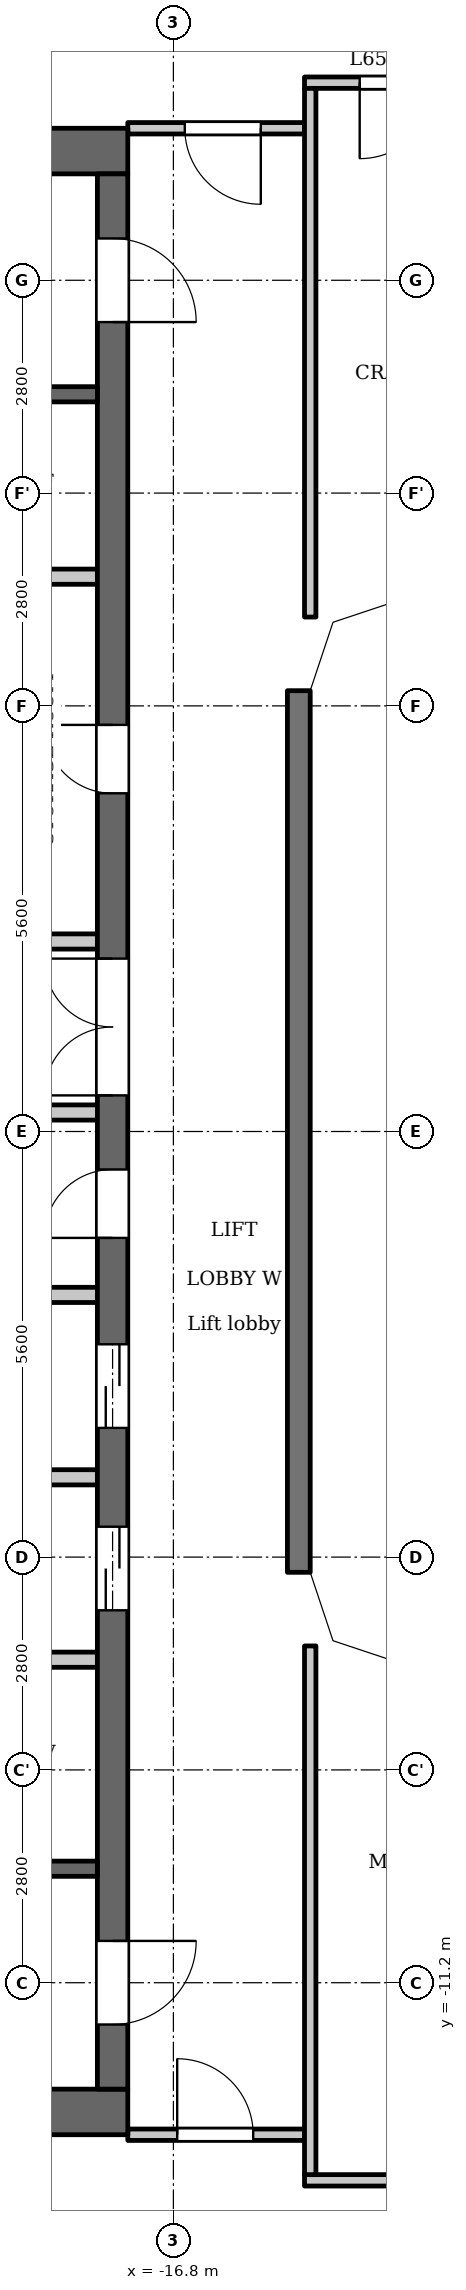
"""IFC4 building model, lengths in metres.
Left out: names, types, materials, properties, quantities, classifications, styles, units other than length and angle.
Written with IfcOpenShell. Run it as: python <this file> out.ifc"""

import sys

from ifc_helpers import new_model, si_unit, direction, frame, frame_2d, origin, place, context, subcontext, project, spatial, polyline, rectangle, outline, extrude, element, fill, save


model = new_model("IFC4")
c1 = context("Model", 3, precision=1e-05, world=origin(), true_north=direction((0.0, 1.0)))
c2 = subcontext(c1, "Body", "Model", "MODEL_VIEW")
j1 = project(units=[si_unit("LENGTHUNIT", "METRE"), si_unit("PLANEANGLEUNIT", "RADIAN")], contexts=[c1])
p1 = place(None, origin())
s1 = spatial("IfcSite", under=j1, at=p1, CompositionType="ELEMENT")
p2 = place(p1, origin())
s2 = spatial("IfcBuilding", under=s1, at=p2, CompositionType="ELEMENT")
p3 = place(p2, frame((0.0, 0.0, 252.2)))
s3 = spatial("IfcBuildingStorey", under=s2, at=p3, CompositionType="ELEMENT", Elevation=252.2)
p4 = place(p3, frame((-15.15, -5.8, 0.0), z_axis=(0.0, 0.0, 1.0), x_axis=(0.0, 1.0, 0.0)))
e1 = element("IfcWall", 1, at=p4, inside=s3, PredefinedType="SOLIDWALL", context=c2, shape_type="SweptSolid", body=[
    extrude(rectangle(XDim=11.6, YDim=0.3, at=frame_2d((5.8, 0.0))), origin(), (0.0, 0.0, 1.0), 3.2),
])
for number, where, z_axis, x_axis in (
    (2, (-17.4, 12.9, 0.0), (0.0, 0.0, 1.0), (-1.0, 0.0, 0.0)),
    (3, (-17.4, -12.9, 0.0), (0.0, 0.0, 1.0), (-1.0, 0.0, 0.0)),
):
    element("IfcWall", number, at=place(p3, frame(where, z_axis=z_axis, x_axis=x_axis)), inside=s3, PredefinedType="SHEAR", context=c2, shape_type="SweptSolid", body=[
        extrude(rectangle(XDim=7.32, YDim=0.6, at=frame_2d((3.66, 0.0))), origin(), (0.0, 0.0, 1.0), 3.2),
    ])
p5 = place(p3, frame((-17.6, -12.6, 0.0), z_axis=(0.0, 0.0, 1.0), x_axis=(0.0, 1.0, 0.0)))
e4 = element("IfcWall", 4, at=p5, inside=s3, PredefinedType="SHEAR", context=c2, shape_type="SweptSolid", body=[
    extrude(rectangle(XDim=25.2, YDim=0.4, at=frame_2d((12.6, 0.0))), origin(), (0.0, 0.0, 1.0), 3.2),
])
p6 = place(p5, frame((6.3, 0.0, 0.0)))
e5 = element("IfcOpeningElement", 5, at=p6, cuts=e4, PredefinedType="OPENING", context=c2, shape_type="SweptSolid", body=[
    extrude(rectangle(XDim=1.1, YDim=2.1, at=frame_2d((0.55, 1.05))), frame((0.0, 0.21, 0.0), z_axis=(0.0, -1.0, 0.0), x_axis=(1.0, 0.0, 0.0)), (0.0, 0.0, 1.0), 0.42),
])
p7 = place(p5, frame((8.7, 0.0, 0.0)))
e6 = element("IfcOpeningElement", 6, at=p7, cuts=e4, PredefinedType="OPENING", context=c2, shape_type="SweptSolid", body=[
    extrude(rectangle(XDim=1.1, YDim=2.1, at=frame_2d((0.55, 1.05))), frame((0.0, 0.21, 0.0), z_axis=(0.0, -1.0, 0.0), x_axis=(1.0, 0.0, 0.0)), (0.0, 0.0, 1.0), 0.42),
])
p8 = place(p5, frame((11.2, 0.0, 0.0)))
e7 = element("IfcOpeningElement", 7, at=p8, cuts=e4, PredefinedType="OPENING", context=c2, shape_type="SweptSolid", body=[
    extrude(rectangle(XDim=0.9, YDim=2.1, at=frame_2d((0.45, 1.05))), frame((0.0, 0.21, 0.0), z_axis=(0.0, -1.0, 0.0), x_axis=(1.0, 0.0, 0.0)), (0.0, 0.0, 1.0), 0.42),
])
p9 = place(p5, frame((17.05, 0.0, 0.0)))
e8 = element("IfcOpeningElement", 8, at=p9, cuts=e4, PredefinedType="OPENING", context=c2, shape_type="SweptSolid", body=[
    extrude(rectangle(XDim=0.9, YDim=2.1, at=frame_2d((0.45, 1.05))), frame((0.0, 0.21, 0.0), z_axis=(0.0, -1.0, 0.0), x_axis=(1.0, 0.0, 0.0)), (0.0, 0.0, 1.0), 0.42),
])
p10 = place(p5, frame((23.25, 0.0, 0.0)))
e9 = element("IfcOpeningElement", 9, at=p10, cuts=e4, PredefinedType="OPENING", context=c2, shape_type="SweptSolid", body=[
    extrude(rectangle(XDim=1.1, YDim=2.1, at=frame_2d((0.55, 1.05))), frame((0.0, 0.21, 0.0), z_axis=(0.0, -1.0, 0.0), x_axis=(1.0, 0.0, 0.0)), (0.0, 0.0, 1.0), 0.42),
])
p11 = place(p5, frame((0.85, 0.0, 0.0)))
e10 = element("IfcOpeningElement", 10, at=p11, cuts=e4, PredefinedType="OPENING", context=c2, shape_type="SweptSolid", body=[
    extrude(rectangle(XDim=1.1, YDim=2.1, at=frame_2d((0.55, 1.05))), frame((0.0, 0.21, 0.0), z_axis=(0.0, -1.0, 0.0), x_axis=(1.0, 0.0, 0.0)), (0.0, 0.0, 1.0), 0.42),
])
p12 = place(p5, frame((13.075, 0.0, 0.0)))
e11 = element("IfcOpeningElement", 11, at=p12, cuts=e4, PredefinedType="OPENING", context=c2, shape_type="SweptSolid", body=[
    extrude(rectangle(XDim=1.8, YDim=2.1, at=frame_2d((0.9, 1.05))), frame((0.0, 0.21, 0.0), z_axis=(0.0, -1.0, 0.0), x_axis=(1.0, 0.0, 0.0)), (0.0, 0.0, 1.0), 0.42),
])
p13 = place(p3, frame((-17.8, -9.7, 0.0), z_axis=(0.0, 0.0, 1.0), x_axis=(-1.0, 0.0, 0.0)))
e12 = element("IfcWall", 12, at=p13, inside=s3, PredefinedType="SHEAR", context=c2, shape_type="SweptSolid", body=[
    extrude(rectangle(XDim=5.8, YDim=0.2, at=frame_2d((2.9, 0.0))), origin(), (0.0, 0.0, 1.0), 3.2),
])
p14 = place(p13, frame((0.85, 0.0, 0.0)))
e13 = element("IfcOpeningElement", 13, at=p14, cuts=e12, PredefinedType="OPENING", context=c2, shape_type="SweptSolid", body=[
    extrude(rectangle(XDim=1.1, YDim=2.1, at=frame_2d((0.55, 1.05))), frame((0.0, 0.11, 0.0), z_axis=(0.0, -1.0, 0.0), x_axis=(1.0, 0.0, 0.0)), (0.0, 0.0, 1.0), 0.22),
])
p15 = place(p13, frame((3.75, 0.0, 0.0)))
e14 = element("IfcOpeningElement", 14, at=p15, cuts=e12, PredefinedType="OPENING", context=c2, shape_type="SweptSolid", body=[
    extrude(rectangle(XDim=1.1, YDim=2.1, at=frame_2d((0.55, 1.05))), frame((0.0, 0.11, 0.0), z_axis=(0.0, -1.0, 0.0), x_axis=(1.0, 0.0, 0.0)), (0.0, 0.0, 1.0), 0.22),
])
for number, where, z_axis, x_axis in (
    (15, (-17.8, -6.95, 0.0), (0.0, 0.0, 1.0), (-1.0, 0.0, 0.0)),
    (16, (-17.8, -4.55, 0.0), (0.0, 0.0, 1.0), (-1.0, 0.0, 0.0)),
    (17, (-17.8, -2.15, 0.0), (0.0, 0.0, 1.0), (-1.0, 0.0, 0.0)),
):
    element("IfcWall", number, at=place(p3, frame(where, z_axis=z_axis, x_axis=x_axis)), inside=s3, PredefinedType="PARTITIONING", context=c2, shape_type="SweptSolid", body=[
        extrude(rectangle(XDim=2.8, YDim=0.2, at=frame_2d((1.4, 0.0))), origin(), (0.0, 0.0, 1.0), 3.2),
    ])
p16 = place(p3, frame((-17.8, 0.25, 0.0), z_axis=(0.0, 0.0, 1.0), x_axis=(-1.0, 0.0, 0.0)))
e18 = element("IfcWall", 18, at=p16, inside=s3, PredefinedType="PARTITIONING", context=c2, shape_type="SweptSolid", body=[
    extrude(rectangle(XDim=3.0, YDim=0.2, at=frame_2d((1.5, 0.0))), origin(), (0.0, 0.0, 1.0), 3.2),
])
p17 = place(p3, frame((-17.8, 2.5, 0.0), z_axis=(0.0, 0.0, 1.0), x_axis=(-1.0, 0.0, 0.0)))
e19 = element("IfcWall", 19, at=p17, inside=s3, PredefinedType="PARTITIONING", context=c2, shape_type="SweptSolid", body=[
    extrude(rectangle(XDim=3.0, YDim=0.2, at=frame_2d((1.5, 0.0))), origin(), (0.0, 0.0, 1.0), 3.2),
])
p18 = place(p17, frame((1.7, 0.0, 0.0)))
e20 = element("IfcOpeningElement", 20, at=p18, cuts=e19, PredefinedType="OPENING", context=c2, shape_type="SweptSolid", body=[
    extrude(rectangle(XDim=0.9, YDim=2.1, at=frame_2d((0.45, 1.05))), frame((0.0, 0.11, 0.0), z_axis=(0.0, -1.0, 0.0), x_axis=(1.0, 0.0, 0.0)), (0.0, 0.0, 1.0), 0.22),
])
p19 = place(p3, frame((-17.8, 7.3, 0.0), z_axis=(0.0, 0.0, 1.0), x_axis=(-1.0, 0.0, 0.0)))
e21 = element("IfcWall", 21, at=p19, inside=s3, PredefinedType="PARTITIONING", context=c2, shape_type="SweptSolid", body=[
    extrude(rectangle(XDim=2.8, YDim=0.2, at=frame_2d((1.4, 0.0))), origin(), (0.0, 0.0, 1.0), 3.2),
])
p20 = place(p3, frame((-17.8, 9.7, 0.0), z_axis=(0.0, 0.0, 1.0), x_axis=(-1.0, 0.0, 0.0)))
e22 = element("IfcWall", 22, at=p20, inside=s3, PredefinedType="SHEAR", context=c2, shape_type="SweptSolid", body=[
    extrude(rectangle(XDim=5.8, YDim=0.2, at=frame_2d((2.9, 0.0))), origin(), (0.0, 0.0, 1.0), 3.2),
])
p21 = place(p20, frame((0.85, 0.0, 0.0)))
e23 = element("IfcOpeningElement", 23, at=p21, cuts=e22, PredefinedType="OPENING", context=c2, shape_type="SweptSolid", body=[
    extrude(rectangle(XDim=1.1, YDim=2.1, at=frame_2d((0.55, 1.05))), frame((0.0, 0.11, 0.0), z_axis=(0.0, -1.0, 0.0), x_axis=(1.0, 0.0, 0.0)), (0.0, 0.0, 1.0), 0.22),
])
p22 = place(p20, frame((3.75, 0.0, 0.0)))
e24 = element("IfcOpeningElement", 24, at=p22, cuts=e22, PredefinedType="OPENING", context=c2, shape_type="SweptSolid", body=[
    extrude(rectangle(XDim=1.1, YDim=2.1, at=frame_2d((0.55, 1.05))), frame((0.0, 0.11, 0.0), z_axis=(0.0, -1.0, 0.0), x_axis=(1.0, 0.0, 0.0)), (0.0, 0.0, 1.0), 0.22),
])
p23 = place(p3, frame((-15.075, -13.8, 0.0), z_axis=(0.0, 0.0, 1.0), x_axis=(1.0, 0.0, 0.0)))
e25 = element("IfcWall", 25, at=p23, inside=s3, PredefinedType="PARTITIONING", context=c2, shape_type="SweptSolid", body=[
    extrude(rectangle(XDim=30.15, YDim=0.15, at=frame_2d((15.075, 0.0))), origin(), (0.0, 0.0, 1.0), 3.2),
])
p24 = place(p23, frame((2.225, 0.0, 0.0)))
e26 = element("IfcOpeningElement", 26, at=p24, cuts=e25, PredefinedType="OPENING", context=c2, shape_type="SweptSolid", body=[
    extrude(rectangle(XDim=1.0, YDim=2.1, at=frame_2d((0.5, 1.05))), frame((0.0, 0.085, 0.0), z_axis=(0.0, -1.0, 0.0), x_axis=(1.0, 0.0, 0.0)), (0.0, 0.0, 1.0), 0.17),
])
p25 = place(p23, frame((4.575, 0.0, 0.0)))
e27 = element("IfcOpeningElement", 27, at=p25, cuts=e25, PredefinedType="OPENING", context=c2, shape_type="SweptSolid", body=[
    extrude(rectangle(XDim=1.0, YDim=2.1, at=frame_2d((0.5, 1.05))), frame((0.0, 0.085, 0.0), z_axis=(0.0, -1.0, 0.0), x_axis=(1.0, 0.0, 0.0)), (0.0, 0.0, 1.0), 0.17),
])
p26 = place(p23, frame((13.425, 0.0, 0.0)))
e28 = element("IfcOpeningElement", 28, at=p26, cuts=e25, PredefinedType="OPENING", context=c2, shape_type="SweptSolid", body=[
    extrude(rectangle(XDim=1.0, YDim=2.1, at=frame_2d((0.5, 1.05))), frame((0.0, 0.085, 0.0), z_axis=(0.0, -1.0, 0.0), x_axis=(1.0, 0.0, 0.0)), (0.0, 0.0, 1.0), 0.17),
])
p27 = place(p23, frame((15.775, 0.0, 0.0)))
e29 = element("IfcOpeningElement", 29, at=p27, cuts=e25, PredefinedType="OPENING", context=c2, shape_type="SweptSolid", body=[
    extrude(rectangle(XDim=1.0, YDim=2.1, at=frame_2d((0.5, 1.05))), frame((0.0, 0.085, 0.0), z_axis=(0.0, -1.0, 0.0), x_axis=(1.0, 0.0, 0.0)), (0.0, 0.0, 1.0), 0.17),
])
p28 = place(p23, frame((24.625, 0.0, 0.0)))
e30 = element("IfcOpeningElement", 30, at=p28, cuts=e25, PredefinedType="OPENING", context=c2, shape_type="SweptSolid", body=[
    extrude(rectangle(XDim=1.0, YDim=2.1, at=frame_2d((0.5, 1.05))), frame((0.0, 0.085, 0.0), z_axis=(0.0, -1.0, 0.0), x_axis=(1.0, 0.0, 0.0)), (0.0, 0.0, 1.0), 0.17),
])
p29 = place(p23, frame((26.924, 0.0, 0.0)))
e31 = element("IfcOpeningElement", 31, at=p29, cuts=e25, PredefinedType="OPENING", context=c2, shape_type="SweptSolid", body=[
    extrude(rectangle(XDim=1.0, YDim=2.1, at=frame_2d((0.5, 1.05))), frame((0.0, 0.085, 0.0), z_axis=(0.0, -1.0, 0.0), x_axis=(1.0, 0.0, 0.0)), (0.0, 0.0, 1.0), 0.17),
])
p30 = place(p3, frame((-17.4, -13.2, 0.0), z_axis=(0.0, 0.0, 1.0), x_axis=(1.0, 0.0, 0.0)))
e32 = element("IfcWall", 32, at=p30, inside=s3, PredefinedType="PARTITIONING", context=c2, shape_type="SweptSolid", body=[
    extrude(rectangle(XDim=2.325, YDim=0.15, at=frame_2d((1.163, 0.0))), origin(), (0.0, 0.0, 1.0), 3.2),
])
p31 = place(p30, frame((0.65, 0.0, 0.0)))
e33 = element("IfcOpeningElement", 33, at=p31, cuts=e32, PredefinedType="OPENING", context=c2, shape_type="SweptSolid", body=[
    extrude(rectangle(XDim=1.0, YDim=2.1, at=frame_2d((0.5, 1.05))), frame((0.0, 0.085, 0.0), z_axis=(0.0, -1.0, 0.0), x_axis=(1.0, 0.0, 0.0)), (0.0, 0.0, 1.0), 0.17),
])
p32 = place(p3, frame((-17.4, 13.2, 0.0), z_axis=(0.0, 0.0, 1.0), x_axis=(1.0, 0.0, 0.0)))
e34 = element("IfcWall", 34, at=p32, inside=s3, PredefinedType="PARTITIONING", context=c2, shape_type="SweptSolid", body=[
    extrude(rectangle(XDim=2.325, YDim=0.15, at=frame_2d((1.163, 0.0))), origin(), (0.0, 0.0, 1.0), 3.2),
])
p33 = place(p32, frame((0.75, 0.0, 0.0)))
e35 = element("IfcOpeningElement", 35, at=p33, cuts=e34, PredefinedType="OPENING", context=c2, shape_type="SweptSolid", body=[
    extrude(rectangle(XDim=1.0, YDim=2.1, at=frame_2d((0.5, 1.05))), frame((0.0, 0.085, 0.0), z_axis=(0.0, -1.0, 0.0), x_axis=(1.0, 0.0, 0.0)), (0.0, 0.0, 1.0), 0.17),
])
p34 = place(p3, frame((-15.075, 13.8, 0.0), z_axis=(0.0, 0.0, 1.0), x_axis=(1.0, 0.0, 0.0)))
e36 = element("IfcWall", 36, at=p34, inside=s3, PredefinedType="PARTITIONING", context=c2, shape_type="SweptSolid", body=[
    extrude(rectangle(XDim=30.15, YDim=0.15, at=frame_2d((15.075, 0.0))), origin(), (0.0, 0.0, 1.0), 3.2),
])
p35 = place(p34, frame((0.726, 0.0, 0.0)))
e37 = element("IfcOpeningElement", 37, at=p35, cuts=e36, PredefinedType="OPENING", context=c2, shape_type="SweptSolid", body=[
    extrude(rectangle(XDim=1.0, YDim=2.1, at=frame_2d((0.5, 1.05))), frame((0.0, 0.085, 0.0), z_axis=(0.0, -1.0, 0.0), x_axis=(1.0, 0.0, 0.0)), (0.0, 0.0, 1.0), 0.17),
])
p36 = place(p34, frame((7.775, 0.0, 0.0)))
e38 = element("IfcOpeningElement", 38, at=p36, cuts=e36, PredefinedType="OPENING", context=c2, shape_type="SweptSolid", body=[
    extrude(rectangle(XDim=1.0, YDim=2.1, at=frame_2d((0.5, 1.05))), frame((0.0, 0.085, 0.0), z_axis=(0.0, -1.0, 0.0), x_axis=(1.0, 0.0, 0.0)), (0.0, 0.0, 1.0), 0.17),
])
p37 = place(p34, frame((10.125, 0.0, 0.0)))
e39 = element("IfcOpeningElement", 39, at=p37, cuts=e36, PredefinedType="OPENING", context=c2, shape_type="SweptSolid", body=[
    extrude(rectangle(XDim=1.0, YDim=2.1, at=frame_2d((0.5, 1.05))), frame((0.0, 0.085, 0.0), z_axis=(0.0, -1.0, 0.0), x_axis=(1.0, 0.0, 0.0)), (0.0, 0.0, 1.0), 0.17),
])
p38 = place(p34, frame((18.975, 0.0, 0.0)))
e40 = element("IfcOpeningElement", 40, at=p38, cuts=e36, PredefinedType="OPENING", context=c2, shape_type="SweptSolid", body=[
    extrude(rectangle(XDim=1.0, YDim=2.1, at=frame_2d((0.5, 1.05))), frame((0.0, 0.085, 0.0), z_axis=(0.0, -1.0, 0.0), x_axis=(1.0, 0.0, 0.0)), (0.0, 0.0, 1.0), 0.17),
])
p39 = place(p34, frame((21.325, 0.0, 0.0)))
e41 = element("IfcOpeningElement", 41, at=p39, cuts=e36, PredefinedType="OPENING", context=c2, shape_type="SweptSolid", body=[
    extrude(rectangle(XDim=1.0, YDim=2.1, at=frame_2d((0.5, 1.05))), frame((0.0, 0.085, 0.0), z_axis=(0.0, -1.0, 0.0), x_axis=(1.0, 0.0, 0.0)), (0.0, 0.0, 1.0), 0.17),
])
p40 = place(p34, frame((28.425, 0.0, 0.0)))
e42 = element("IfcOpeningElement", 42, at=p40, cuts=e36, PredefinedType="OPENING", context=c2, shape_type="SweptSolid", body=[
    extrude(rectangle(XDim=1.0, YDim=2.1, at=frame_2d((0.5, 1.05))), frame((0.0, 0.085, 0.0), z_axis=(0.0, -1.0, 0.0), x_axis=(1.0, 0.0, 0.0)), (0.0, 0.0, 1.0), 0.17),
])
for number, where, z_axis, x_axis in (
    (43, (-15.0, -13.725, 0.0), (0.0, 0.0, 1.0), (0.0, 1.0, 0.0)),
    (44, (-15.0, 6.769, 0.0), (0.0, 0.0, 1.0), (0.0, 1.0, 0.0)),
):
    element("IfcWall", number, at=place(p3, frame(where, z_axis=z_axis, x_axis=x_axis)), inside=s3, PredefinedType="PARTITIONING", context=c2, shape_type="SweptSolid", body=[
        extrude(rectangle(XDim=6.956, YDim=0.15, at=frame_2d((3.478, 0.0))), origin(), (0.0, 0.0, 1.0), 3.2),
    ])
p41 = place(p3, origin())
e45 = element("IfcWall", 45, at=p41, inside=s3, PredefinedType="SOLIDWALL", context=c2, shape_type="SweptSolid", body=[
    extrude(outline(polyline([(-13.849, 7.3), (-14.937, 6.937), (-15.3, 5.849), (-15.3, 5.8), (-15.0, 5.8), (-14.7, 6.7), (-13.8, 7.0), (-13.8, 7.3), (-13.849, 7.3)])), origin(), (0.0, 0.0, 1.0), 3.2),
])
e46 = element("IfcWall", 46, at=p41, inside=s3, PredefinedType="SOLIDWALL", context=c2, shape_type="SweptSolid", body=[
    extrude(outline(polyline([(-14.937, -6.937), (-13.849, -7.3), (-13.8, -7.3), (-13.8, -7.0), (-14.7, -6.7), (-15.0, -5.8), (-15.3, -5.8), (-15.3, -5.849), (-14.937, -6.937)])), origin(), (0.0, 0.0, 1.0), 3.2),
])
p42 = place(p6, origin())
e47 = element("IfcDoor", 47, at=p42, inside=s3, OperationType="DOUBLE_DOOR_SLIDING", PredefinedType="DOOR", context=c2, shape_type="SweptSolid", body=[
    extrude(rectangle(XDim=1.1, YDim=2.1, at=frame_2d((0.55, 1.05))), frame((0.0, 0.025, 0.0), z_axis=(0.0, -1.0, 0.0), x_axis=(1.0, 0.0, 0.0)), (0.0, 0.0, 1.0), 0.05),
])
fill(e5, e47)
p43 = place(p7, origin())
e48 = element("IfcDoor", 48, at=p43, inside=s3, OperationType="DOUBLE_DOOR_SLIDING", PredefinedType="DOOR", context=c2, shape_type="SweptSolid", body=[
    extrude(rectangle(XDim=1.1, YDim=2.1, at=frame_2d((0.55, 1.05))), frame((0.0, 0.025, 0.0), z_axis=(0.0, -1.0, 0.0), x_axis=(1.0, 0.0, 0.0)), (0.0, 0.0, 1.0), 0.05),
])
fill(e6, e48)
p44 = place(p8, origin())
e49 = element("IfcDoor", 49, at=p44, inside=s3, OperationType="SINGLE_SWING_RIGHT", PredefinedType="DOOR", context=c2, shape_type="SweptSolid", body=[
    extrude(rectangle(XDim=0.9, YDim=2.1, at=frame_2d((0.45, 1.05))), frame((0.0, 0.025, 0.0), z_axis=(0.0, -1.0, 0.0), x_axis=(1.0, 0.0, 0.0)), (0.0, 0.0, 1.0), 0.05),
])
fill(e7, e49)
p45 = place(p9, origin())
e50 = element("IfcDoor", 50, at=p45, inside=s3, OperationType="SINGLE_SWING_LEFT", PredefinedType="DOOR", context=c2, shape_type="SweptSolid", body=[
    extrude(rectangle(XDim=0.9, YDim=2.1, at=frame_2d((0.45, 1.05))), frame((0.0, 0.025, 0.0), z_axis=(0.0, -1.0, 0.0), x_axis=(1.0, 0.0, 0.0)), (0.0, 0.0, 1.0), 0.05),
])
fill(e8, e50)
p46 = place(p10, origin())
e51 = element("IfcDoor", 51, at=p46, inside=s3, OperationType="SINGLE_SWING_LEFT", PredefinedType="DOOR", context=c2, shape_type="SweptSolid", body=[
    extrude(rectangle(XDim=1.1, YDim=2.1, at=frame_2d((0.55, 1.05))), frame((0.0, 0.025, 0.0), z_axis=(0.0, -1.0, 0.0), x_axis=(1.0, 0.0, 0.0)), (0.0, 0.0, 1.0), 0.05),
])
fill(e9, e51)
p47 = place(p11, origin())
e52 = element("IfcDoor", 52, at=p47, inside=s3, OperationType="SINGLE_SWING_RIGHT", PredefinedType="DOOR", context=c2, shape_type="SweptSolid", body=[
    extrude(rectangle(XDim=1.1, YDim=2.1, at=frame_2d((0.55, 1.05))), frame((0.0, 0.025, 0.0), z_axis=(0.0, -1.0, 0.0), x_axis=(1.0, 0.0, 0.0)), (0.0, 0.0, 1.0), 0.05),
])
fill(e10, e52)
p48 = place(p12, origin())
e53 = element("IfcDoor", 53, at=p48, inside=s3, OperationType="DOUBLE_DOOR_SINGLE_SWING", PredefinedType="DOOR", context=c2, shape_type="SweptSolid", body=[
    extrude(rectangle(XDim=1.8, YDim=2.1, at=frame_2d((0.9, 1.05))), frame((0.0, 0.025, 0.0), z_axis=(0.0, -1.0, 0.0), x_axis=(1.0, 0.0, 0.0)), (0.0, 0.0, 1.0), 0.05),
])
fill(e11, e53)
p49 = place(p33, origin())
e54 = element("IfcDoor", 54, at=p49, inside=s3, OperationType="SINGLE_SWING_RIGHT", PredefinedType="DOOR", context=c2, shape_type="SweptSolid", body=[
    extrude(rectangle(XDim=1.0, YDim=2.1, at=frame_2d((0.5, 1.05))), frame((0.0, 0.025, 0.0), z_axis=(0.0, -1.0, 0.0), x_axis=(1.0, 0.0, 0.0)), (0.0, 0.0, 1.0), 0.05),
])
fill(e35, e54)
p50 = place(p31, origin())
e55 = element("IfcDoor", 55, at=p50, inside=s3, OperationType="SINGLE_SWING_RIGHT", PredefinedType="DOOR", context=c2, shape_type="SweptSolid", body=[
    extrude(rectangle(XDim=1.0, YDim=2.1, at=frame_2d((0.5, 1.05))), frame((0.0, 0.025, 0.0), z_axis=(0.0, -1.0, 0.0), x_axis=(1.0, 0.0, 0.0)), (0.0, 0.0, 1.0), 0.05),
])
fill(e33, e55)
p51 = place(p35, origin())
e56 = element("IfcDoor", 56, at=p51, inside=s3, OperationType="SINGLE_SWING_LEFT", PredefinedType="DOOR", context=c2, shape_type="SweptSolid", body=[
    extrude(rectangle(XDim=1.0, YDim=2.1, at=frame_2d((0.5, 1.05))), frame((0.0, 0.025, 0.0), z_axis=(0.0, -1.0, 0.0), x_axis=(1.0, 0.0, 0.0)), (0.0, 0.0, 1.0), 0.05),
])
fill(e37, e56)
save(model, sys.argv[1])
